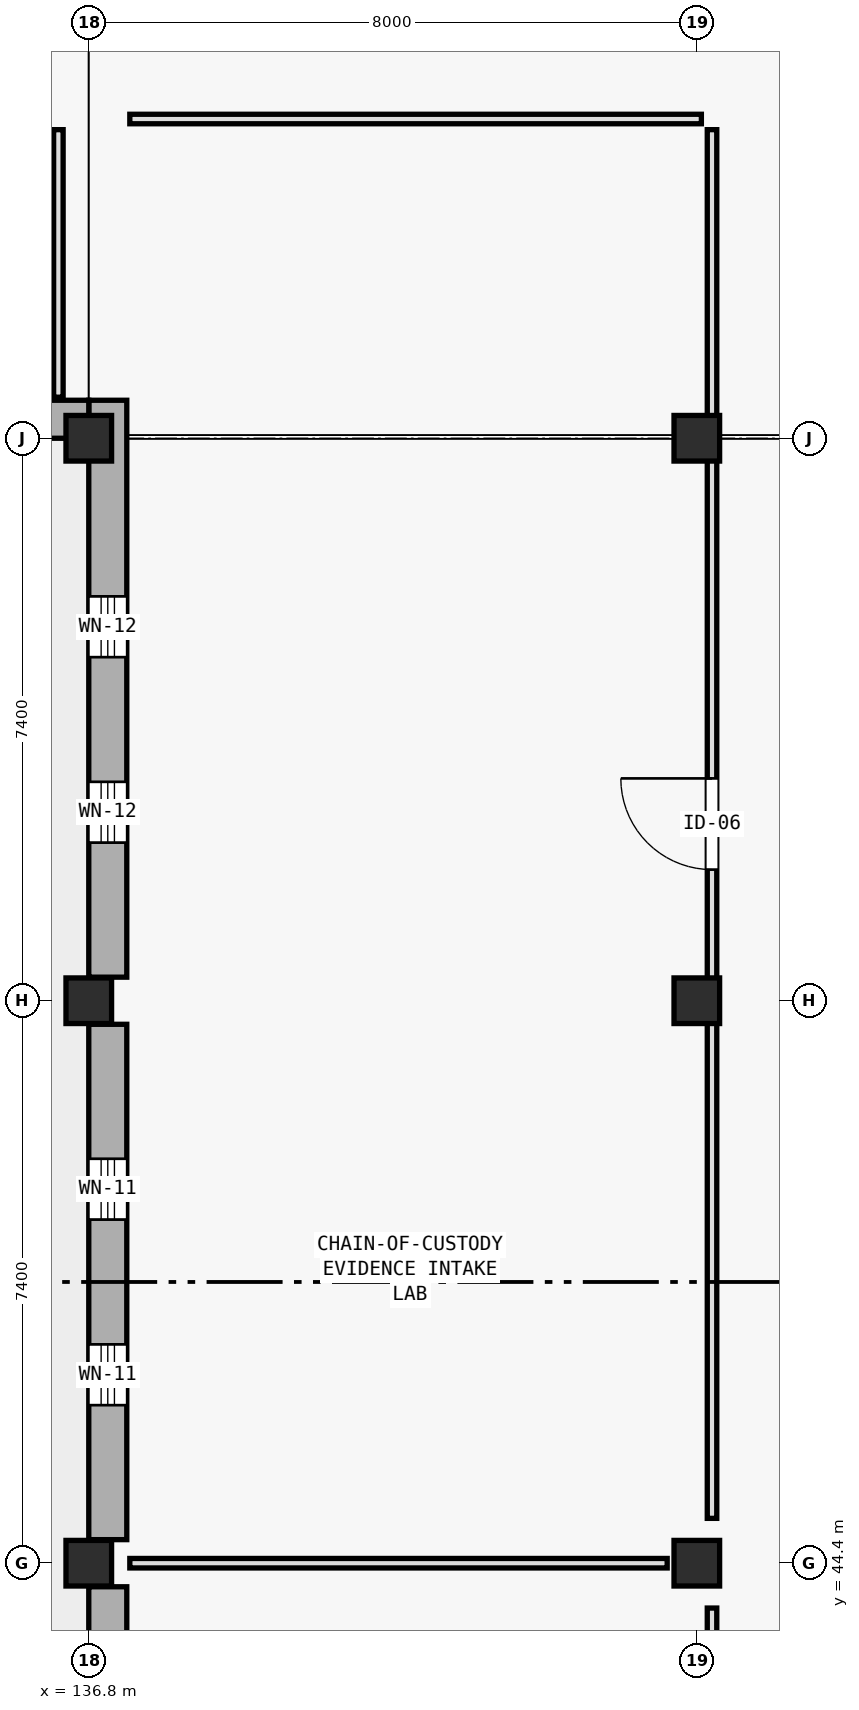
"""IFC4 building model, lengths in metres.
Left out: names, types, materials, properties, quantities, classifications, styles, units other than length and angle.
Written with IfcOpenShell. Run it as: python <this file> out.ifc"""

import sys

from ifc_helpers import new_model, si_unit, direction, frame, frame_2d, origin, origin_2d, place, context, subcontext, project, spatial, rectangle, extrude, element, fill, save


model = new_model("IFC4")
c1 = context("Model", 3, precision=1e-05, world=origin(), true_north=direction((0.0, 1.0)))
c2 = subcontext(c1, "Body", "Model", "MODEL_VIEW")
j1 = project(units=[si_unit("LENGTHUNIT", "METRE"), si_unit("PLANEANGLEUNIT", "RADIAN")], contexts=[c1])
p1 = place(None, origin())
s1 = spatial("IfcSite", under=j1, at=p1, CompositionType="ELEMENT")
p2 = place(p1, origin())
s2 = spatial("IfcBuilding", under=s1, at=p2, CompositionType="ELEMENT")
p3 = place(p2, origin())
s3 = spatial("IfcBuildingStorey", under=s2, at=p3, CompositionType="ELEMENT", Elevation=0.0)
for number, where, z_axis, x_axis in (
    (1, (136.8, 44.4, 0.0), (0.0, 0.0, 1.0), (1.0, 0.0, 0.0)),
    (2, (136.8, 51.8, 0.0), (0.0, 0.0, 1.0), (1.0, 0.0, 0.0)),
    (3, (136.8, 59.2, 0.0), (0.0, 0.0, 1.0), (1.0, 0.0, 0.0)),
    (4, (144.8, 44.4, 0.0), (0.0, 0.0, 1.0), (1.0, 0.0, 0.0)),
    (5, (144.8, 51.8, 0.0), (0.0, 0.0, 1.0), (1.0, 0.0, 0.0)),
    (6, (144.8, 59.2, 0.0), (0.0, 0.0, 1.0), (1.0, 0.0, 0.0)),
):
    element("IfcColumn", number, at=place(p3, frame(where, z_axis=z_axis, x_axis=x_axis)), inside=s3, PredefinedType="COLUMN", context=c2, shape_type="SweptSolid", body=[
        extrude(rectangle(XDim=0.6, YDim=0.6, at=origin_2d()), origin(), (0.0, 0.0, 1.0), 5.4),
    ])
p4 = place(p3, frame((137.05, 37.31, 0.0), z_axis=(0.0, 0.0, 1.0), x_axis=(0.0, 1.0, 0.0)))
e7 = element("IfcWall", 7, at=p4, inside=s3, PredefinedType="STANDARD", context=c2, shape_type="SweptSolid", body=[
    extrude(rectangle(XDim=6.78, YDim=0.5, at=frame_2d((3.39, 0.0))), origin(), (0.0, 0.0, 1.0), 5.155),
])
p5 = place(p4, frame((1.77, 0.0, 1.35)))
e8 = element("IfcOpeningElement", 8, at=p5, cuts=e7, PredefinedType="OPENING", context=c2, shape_type="SweptSolid", body=[
    extrude(rectangle(XDim=0.8, YDim=1.55, at=frame_2d((0.4, 0.775))), frame((0.0, 0.26, 0.0), z_axis=(0.0, -1.0, 0.0), x_axis=(1.0, 0.0, 0.0)), (0.0, 0.0, 1.0), 0.52),
])
p6 = place(p4, frame((4.21, 0.0, 1.35)))
e9 = element("IfcOpeningElement", 9, at=p6, cuts=e7, PredefinedType="OPENING", context=c2, shape_type="SweptSolid", body=[
    extrude(rectangle(XDim=0.8, YDim=1.55, at=frame_2d((0.4, 0.775))), frame((0.0, 0.26, 0.0), z_axis=(0.0, -1.0, 0.0), x_axis=(1.0, 0.0, 0.0)), (0.0, 0.0, 1.0), 0.52),
])
p7 = place(p3, frame((137.05, 44.71, 0.0), z_axis=(0.0, 0.0, 1.0), x_axis=(0.0, 1.0, 0.0)))
e10 = element("IfcWall", 10, at=p7, inside=s3, PredefinedType="STANDARD", context=c2, shape_type="SweptSolid", body=[
    extrude(rectangle(XDim=6.78, YDim=0.5, at=frame_2d((3.39, 0.0))), origin(), (0.0, 0.0, 1.0), 5.155),
])
p8 = place(p7, frame((1.77, 0.0, 0.9)))
e11 = element("IfcOpeningElement", 11, at=p8, cuts=e10, PredefinedType="OPENING", context=c2, shape_type="SweptSolid", body=[
    extrude(rectangle(XDim=0.8, YDim=1.95, at=frame_2d((0.4, 0.975))), frame((0.0, 0.26, 0.0), z_axis=(0.0, -1.0, 0.0), x_axis=(1.0, 0.0, 0.0)), (0.0, 0.0, 1.0), 0.52),
])
p9 = place(p7, frame((4.21, 0.0, 0.9)))
e12 = element("IfcOpeningElement", 12, at=p9, cuts=e10, PredefinedType="OPENING", context=c2, shape_type="SweptSolid", body=[
    extrude(rectangle(XDim=0.8, YDim=1.95, at=frame_2d((0.4, 0.975))), frame((0.0, 0.26, 0.0), z_axis=(0.0, -1.0, 0.0), x_axis=(1.0, 0.0, 0.0)), (0.0, 0.0, 1.0), 0.52),
])
p10 = place(p3, frame((137.05, 52.11, 0.0), z_axis=(0.0, 0.0, 1.0), x_axis=(0.0, 1.0, 0.0)))
e13 = element("IfcWall", 13, at=p10, inside=s3, PredefinedType="STANDARD", context=c2, shape_type="SweptSolid", body=[
    extrude(rectangle(XDim=7.59, YDim=0.5, at=frame_2d((3.795, 0.0))), origin(), (0.0, 0.0, 1.0), 5.155),
])
p11 = place(p10, frame((1.77, 0.0, 0.9)))
e14 = element("IfcOpeningElement", 14, at=p11, cuts=e13, PredefinedType="OPENING", context=c2, shape_type="SweptSolid", body=[
    extrude(rectangle(XDim=0.8, YDim=2.35, at=frame_2d((0.4, 1.175))), frame((0.0, 0.26, 0.0), z_axis=(0.0, -1.0, 0.0), x_axis=(1.0, 0.0, 0.0)), (0.0, 0.0, 1.0), 0.52),
])
p12 = place(p10, frame((4.21, 0.0, 0.9)))
e15 = element("IfcOpeningElement", 15, at=p12, cuts=e13, PredefinedType="OPENING", context=c2, shape_type="SweptSolid", body=[
    extrude(rectangle(XDim=0.8, YDim=2.35, at=frame_2d((0.4, 1.175))), frame((0.0, 0.26, 0.0), z_axis=(0.0, -1.0, 0.0), x_axis=(1.0, 0.0, 0.0)), (0.0, 0.0, 1.0), 0.52),
])
p13 = place(p3, frame((136.8, 59.45, 0.0), z_axis=(0.0, 0.0, 1.0), x_axis=(-1.0, 0.0, 0.0)))
e16 = element("IfcWall", 16, at=p13, inside=s3, PredefinedType="STANDARD", context=c2, shape_type="SweptSolid", body=[
    extrude(rectangle(XDim=7.69, YDim=0.5, at=frame_2d((3.845, 0.0))), origin(), (0.0, 0.0, 1.0), 5.14),
])
p14 = place(p13, frame((2.197, 0.0, 0.9)))
e17 = element("IfcOpeningElement", 17, at=p14, cuts=e16, PredefinedType="OPENING", context=c2, shape_type="SweptSolid", body=[
    extrude(rectangle(XDim=0.95, YDim=1.8, at=frame_2d((0.475, 0.9))), frame((0.0, 0.26, 0.0), z_axis=(0.0, -1.0, 0.0), x_axis=(1.0, 0.0, 0.0)), (0.0, 0.0, 1.0), 0.52),
])
p15 = place(p13, frame((4.854, 0.0, 0.9)))
e18 = element("IfcOpeningElement", 18, at=p15, cuts=e16, PredefinedType="OPENING", context=c2, shape_type="SweptSolid", body=[
    extrude(rectangle(XDim=0.95, YDim=1.8, at=frame_2d((0.475, 0.9))), frame((0.0, 0.26, 0.0), z_axis=(0.0, -1.0, 0.0), x_axis=(1.0, 0.0, 0.0)), (0.0, 0.0, 1.0), 0.52),
])
p16 = place(p3, frame((136.4, 59.74, 0.0), z_axis=(0.0, 0.0, 1.0), x_axis=(0.0, 1.0, 0.0)))
e19 = element("IfcWall", 19, at=p16, inside=s3, PredefinedType="PARTITIONING", context=c2, shape_type="SweptSolid", body=[
    extrude(rectangle(XDim=3.52, YDim=0.125, at=frame_2d((1.76, 0.0))), origin(), (0.0, 0.0, 1.0), 5.14),
])
p17 = place(p3, frame((137.34, 44.4, 0.0), z_axis=(0.0, 0.0, 1.0), x_axis=(1.0, 0.0, 0.0)))
e20 = element("IfcWall", 20, at=p17, inside=s3, PredefinedType="PARTITIONING", context=c2, shape_type="SweptSolid", body=[
    extrude(rectangle(XDim=7.07, YDim=0.125, at=frame_2d((3.535, 0.0))), origin(), (0.0, 0.0, 1.0), 4.285),
])
p18 = place(p3, frame((145.0, 22.39, 0.0), z_axis=(0.0, 0.0, 1.0), x_axis=(0.0, 1.0, 0.0)))
e21 = element("IfcWall", 21, at=p18, inside=s3, PredefinedType="PARTITIONING", context=c2, shape_type="SweptSolid", body=[
    extrude(rectangle(XDim=21.42, YDim=0.125, at=frame_2d((10.71, 0.0))), origin(), (0.0, 0.0, 1.0), 4.285),
])
p19 = place(p18, frame((10.11, 0.0, 0.0)))
e22 = element("IfcOpeningElement", 22, at=p19, cuts=e21, PredefinedType="OPENING", context=c2, shape_type="SweptSolid", body=[
    extrude(rectangle(XDim=1.2, YDim=2.2, at=frame_2d((0.6, 1.1))), frame((0.0, 0.073, 0.0), z_axis=(0.0, -1.0, 0.0), x_axis=(1.0, 0.0, 0.0)), (0.0, 0.0, 1.0), 0.145),
])
p20 = place(p3, frame((137.34, 63.4, 0.0), z_axis=(0.0, 0.0, 1.0), x_axis=(1.0, 0.0, 0.0)))
e23 = element("IfcWall", 23, at=p20, inside=s3, PredefinedType="PARTITIONING", context=c2, shape_type="SweptSolid", body=[
    extrude(rectangle(XDim=7.52, YDim=0.125, at=frame_2d((3.76, 0.0))), origin(), (0.0, 0.0, 1.0), 4.285),
])
p21 = place(p3, frame((145.0, 44.99, 0.0), z_axis=(0.0, 0.0, 1.0), x_axis=(0.0, 1.0, 0.0)))
e24 = element("IfcWall", 24, at=p21, inside=s3, PredefinedType="PARTITIONING", context=c2, shape_type="SweptSolid", body=[
    extrude(rectangle(XDim=18.27, YDim=0.125, at=frame_2d((9.135, 0.0))), origin(), (0.0, 0.0, 1.0), 4.285),
])
p22 = place(p21, frame((8.535, 0.0, 0.0)))
e25 = element("IfcOpeningElement", 25, at=p22, cuts=e24, PredefinedType="OPENING", context=c2, shape_type="SweptSolid", body=[
    extrude(rectangle(XDim=1.2, YDim=2.2, at=frame_2d((0.6, 1.1))), frame((0.0, 0.073, 0.0), z_axis=(0.0, -1.0, 0.0), x_axis=(1.0, 0.0, 0.0)), (0.0, 0.0, 1.0), 0.145),
])
p23 = place(p8, origin())
e26 = element("IfcWindow", 26, at=p23, inside=s3, PartitioningType="SINGLE_PANEL", PredefinedType="WINDOW", context=c2, shape_type="SweptSolid", body=[
    extrude(rectangle(XDim=0.8, YDim=1.95, at=frame_2d((0.4, 0.975))), frame((0.0, 0.03, 0.0), z_axis=(0.0, -1.0, 0.0), x_axis=(1.0, 0.0, 0.0)), (0.0, 0.0, 1.0), 0.06),
])
fill(e11, e26)
p24 = place(p9, origin())
e27 = element("IfcWindow", 27, at=p24, inside=s3, PartitioningType="SINGLE_PANEL", PredefinedType="WINDOW", context=c2, shape_type="SweptSolid", body=[
    extrude(rectangle(XDim=0.8, YDim=1.95, at=frame_2d((0.4, 0.975))), frame((0.0, 0.03, 0.0), z_axis=(0.0, -1.0, 0.0), x_axis=(1.0, 0.0, 0.0)), (0.0, 0.0, 1.0), 0.06),
])
fill(e12, e27)
p25 = place(p11, origin())
e28 = element("IfcWindow", 28, at=p25, inside=s3, PartitioningType="SINGLE_PANEL", PredefinedType="WINDOW", context=c2, shape_type="SweptSolid", body=[
    extrude(rectangle(XDim=0.8, YDim=2.35, at=frame_2d((0.4, 1.175))), frame((0.0, 0.03, 0.0), z_axis=(0.0, -1.0, 0.0), x_axis=(1.0, 0.0, 0.0)), (0.0, 0.0, 1.0), 0.06),
])
fill(e14, e28)
p26 = place(p12, origin())
e29 = element("IfcWindow", 29, at=p26, inside=s3, PartitioningType="SINGLE_PANEL", PredefinedType="WINDOW", context=c2, shape_type="SweptSolid", body=[
    extrude(rectangle(XDim=0.8, YDim=2.35, at=frame_2d((0.4, 1.175))), frame((0.0, 0.03, 0.0), z_axis=(0.0, -1.0, 0.0), x_axis=(1.0, 0.0, 0.0)), (0.0, 0.0, 1.0), 0.06),
])
fill(e15, e29)
p27 = place(p22, origin())
e30 = element("IfcDoor", 30, at=p27, inside=s3, OperationType="SINGLE_SWING_RIGHT", PredefinedType="DOOR", context=c2, shape_type="SweptSolid", body=[
    extrude(rectangle(XDim=1.2, YDim=2.2, at=frame_2d((0.6, 1.1))), frame((0.0, 0.025, 0.0), z_axis=(0.0, -1.0, 0.0), x_axis=(1.0, 0.0, 0.0)), (0.0, 0.0, 1.0), 0.05),
])
fill(e25, e30)
save(model, sys.argv[1])
